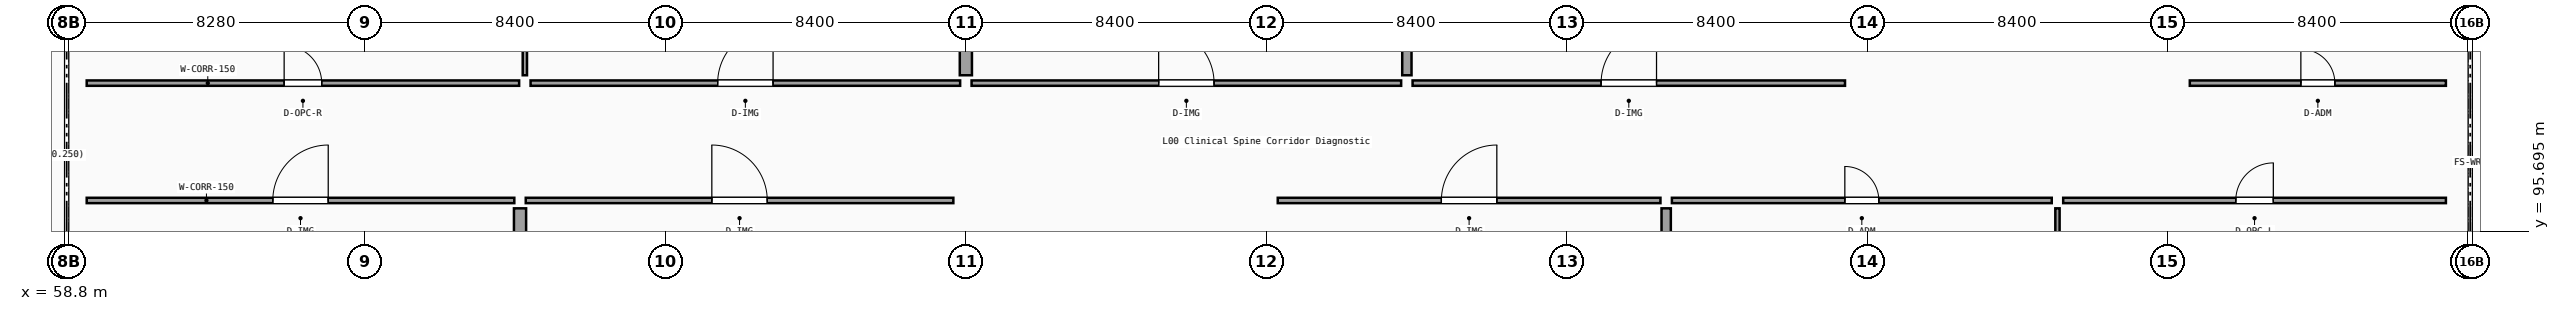
"""IFC4 building model, lengths in metres.
Left out: names, types, materials, properties, quantities, classifications, styles, units other than length and angle.
Written with IfcOpenShell. Run it as: python <this file> out.ifc"""

import sys

from ifc_helpers import new_model, si_unit, direction, frame, frame_2d, origin, place, context, subcontext, project, spatial, rectangle, extrude, element, fill, save


model = new_model("IFC4")
c1 = context("Model", 3, precision=1e-05, world=origin(), true_north=direction((0.0, 1.0)))
c2 = subcontext(c1, "Body", "Model", "MODEL_VIEW")
j1 = project(units=[si_unit("LENGTHUNIT", "METRE"), si_unit("PLANEANGLEUNIT", "RADIAN")], contexts=[c1])
p1 = place(None, origin())
s1 = spatial("IfcSite", under=j1, at=p1, CompositionType="ELEMENT")
p2 = place(p1, origin())
s2 = spatial("IfcBuilding", under=s1, at=p2, CompositionType="ELEMENT")
p3 = place(p2, origin())
s3 = spatial("IfcBuildingStorey", under=s2, at=p3, CompositionType="ELEMENT", Elevation=0.0)
p4 = place(p3, frame((59.42, 96.56, 0.0), z_axis=(0.0, 0.0, 1.0), x_axis=(1.0, 0.0, 0.0)))
e1 = element("IfcWall", 1, at=p4, inside=s3, PredefinedType="PARTITIONING", context=c2, shape_type="SweptSolid", body=[
    extrude(rectangle(XDim=11.955, YDim=0.15, at=frame_2d((5.978, 0.0))), origin(), (0.0, 0.0, 1.0), 4.4),
])
p5 = place(p4, frame((5.202, 0.0, 0.0)))
e2 = element("IfcOpeningElement", 2, at=p5, cuts=e1, PredefinedType="OPENING", context=c2, shape_type="SweptSolid", body=[
    extrude(rectangle(XDim=1.55, YDim=2.25, at=frame_2d((0.775, 1.125))), frame((0.0, 0.085, 0.0), z_axis=(0.0, -1.0, 0.0), x_axis=(1.0, 0.0, 0.0)), (0.0, 0.0, 1.0), 0.17),
])
p6 = place(p3, frame((71.535, 86.69, 0.0), z_axis=(0.0, 0.0, 1.0), x_axis=(0.0, 1.0, 0.0)))
e3 = element("IfcWall", 3, at=p6, inside=s3, PredefinedType="PARTITIONING", context=c2, shape_type="SweptSolid", body=[
    extrude(rectangle(XDim=9.65, YDim=0.34, at=frame_2d((4.825, 0.0))), origin(), (0.0, 0.0, 1.0), 4.31),
])
p7 = place(p3, frame((71.695, 96.56, 0.0), z_axis=(0.0, 0.0, 1.0), x_axis=(1.0, 0.0, 0.0)))
e4 = element("IfcWall", 4, at=p7, inside=s3, PredefinedType="PARTITIONING", context=c2, shape_type="SweptSolid", body=[
    extrude(rectangle(XDim=11.955, YDim=0.15, at=frame_2d((5.978, 0.0))), origin(), (0.0, 0.0, 1.0), 4.4),
])
p8 = place(p7, frame((5.202, 0.0, 0.0)))
e5 = element("IfcOpeningElement", 5, at=p8, cuts=e4, PredefinedType="OPENING", context=c2, shape_type="SweptSolid", body=[
    extrude(rectangle(XDim=1.55, YDim=2.25, at=frame_2d((0.775, 1.125))), frame((0.0, 0.085, 0.0), z_axis=(0.0, -1.0, 0.0), x_axis=(1.0, 0.0, 0.0)), (0.0, 0.0, 1.0), 0.17),
])
p9 = place(p3, frame((92.72, 96.56, 0.0), z_axis=(0.0, 0.0, 1.0), x_axis=(1.0, 0.0, 0.0)))
e6 = element("IfcWall", 6, at=p9, inside=s3, PredefinedType="PARTITIONING", context=c2, shape_type="SweptSolid", body=[
    extrude(rectangle(XDim=10.7, YDim=0.15, at=frame_2d((5.35, 0.0))), origin(), (0.0, 0.0, 1.0), 4.8),
])
p10 = place(p9, frame((4.575, 0.0, 0.0)))
e7 = element("IfcOpeningElement", 7, at=p10, cuts=e6, PredefinedType="OPENING", context=c2, shape_type="SweptSolid", body=[
    extrude(rectangle(XDim=1.55, YDim=2.25, at=frame_2d((0.775, 1.125))), frame((0.0, 0.085, 0.0), z_axis=(0.0, -1.0, 0.0), x_axis=(1.0, 0.0, 0.0)), (0.0, 0.0, 1.0), 0.17),
])
p11 = place(p3, frame((103.58, 86.69, 0.0), z_axis=(0.0, 0.0, 1.0), x_axis=(0.0, 1.0, 0.0)))
e8 = element("IfcWall", 8, at=p11, inside=s3, PredefinedType="PARTITIONING", context=c2, shape_type="SweptSolid", body=[
    extrude(rectangle(XDim=9.65, YDim=0.26, at=frame_2d((4.825, 0.0))), origin(), (0.0, 0.0, 1.0), 4.31),
])
p12 = place(p3, frame((103.74, 96.56, 0.0), z_axis=(0.0, 0.0, 1.0), x_axis=(1.0, 0.0, 0.0)))
e9 = element("IfcWall", 9, at=p12, inside=s3, PredefinedType="PARTITIONING", context=c2, shape_type="SweptSolid", body=[
    extrude(rectangle(XDim=10.62, YDim=0.15, at=frame_2d((5.31, 0.0))), origin(), (0.0, 0.0, 1.0), 4.4),
])
p13 = place(p12, frame((4.835, 0.0, 0.0)))
e10 = element("IfcOpeningElement", 10, at=p13, cuts=e9, PredefinedType="OPENING", context=c2, shape_type="SweptSolid", body=[
    extrude(rectangle(XDim=0.95, YDim=2.1, at=frame_2d((0.475, 1.05))), frame((0.0, 0.085, 0.0), z_axis=(0.0, -1.0, 0.0), x_axis=(1.0, 0.0, 0.0)), (0.0, 0.0, 1.0), 0.17),
])
p14 = place(p3, frame((114.52, 86.69, 0.0), z_axis=(0.0, 0.0, 1.0), x_axis=(0.0, 1.0, 0.0)))
e11 = element("IfcWall", 11, at=p14, inside=s3, PredefinedType="PARTITIONING", context=c2, shape_type="SweptSolid", body=[
    extrude(rectangle(XDim=9.65, YDim=0.12, at=frame_2d((4.825, 0.0))), origin(), (0.0, 0.0, 1.0), 4.31),
])
p15 = place(p3, frame((114.68, 96.56, 0.0), z_axis=(0.0, 0.0, 1.0), x_axis=(1.0, 0.0, 0.0)))
e12 = element("IfcWall", 12, at=p15, inside=s3, PredefinedType="PARTITIONING", context=c2, shape_type="SweptSolid", body=[
    extrude(rectangle(XDim=10.7, YDim=0.15, at=frame_2d((5.35, 0.0))), origin(), (0.0, 0.0, 1.0), 4.4),
])
p16 = place(p15, frame((4.825, 0.0, 0.0)))
e13 = element("IfcOpeningElement", 13, at=p16, cuts=e12, PredefinedType="OPENING", context=c2, shape_type="SweptSolid", body=[
    extrude(rectangle(XDim=1.05, YDim=2.15, at=frame_2d((0.525, 1.075))), frame((0.0, 0.085, 0.0), z_axis=(0.0, -1.0, 0.0), x_axis=(1.0, 0.0, 0.0)), (0.0, 0.0, 1.0), 0.17),
])
p17 = place(p3, frame((59.42, 99.84, 0.0), z_axis=(0.0, 0.0, 1.0), x_axis=(1.0, 0.0, 0.0)))
e14 = element("IfcWall", 14, at=p17, inside=s3, PredefinedType="PARTITIONING", context=c2, shape_type="SweptSolid", body=[
    extrude(rectangle(XDim=12.09, YDim=0.15, at=frame_2d((6.045, 0.0))), origin(), (0.0, 0.0, 1.0), 4.4),
])
p18 = place(p17, frame((5.52, 0.0, 0.0)))
e15 = element("IfcOpeningElement", 15, at=p18, cuts=e14, PredefinedType="OPENING", context=c2, shape_type="SweptSolid", body=[
    extrude(rectangle(XDim=1.05, YDim=2.15, at=frame_2d((0.525, 1.075))), frame((0.0, 0.085, 0.0), z_axis=(0.0, -1.0, 0.0), x_axis=(1.0, 0.0, 0.0)), (0.0, 0.0, 1.0), 0.17),
])
p19 = place(p3, frame((71.67, 100.06, 0.0), z_axis=(0.0, 0.0, 1.0), x_axis=(0.0, 1.0, 0.0)))
e16 = element("IfcWall", 16, at=p19, inside=s3, PredefinedType="PARTITIONING", context=c2, shape_type="SweptSolid", body=[
    extrude(rectangle(XDim=16.05, YDim=0.12, at=frame_2d((8.025, 0.0))), origin(), (0.0, 0.0, 1.0), 4.31),
])
p20 = place(p3, frame((71.83, 99.84, 0.0), z_axis=(0.0, 0.0, 1.0), x_axis=(1.0, 0.0, 0.0)))
e17 = element("IfcWall", 17, at=p20, inside=s3, PredefinedType="PARTITIONING", context=c2, shape_type="SweptSolid", body=[
    extrude(rectangle(XDim=12.01, YDim=0.15, at=frame_2d((6.005, 0.0))), origin(), (0.0, 0.0, 1.0), 4.4),
])
p21 = place(p20, frame((5.23, 0.0, 0.0)))
e18 = element("IfcOpeningElement", 18, at=p21, cuts=e17, PredefinedType="OPENING", context=c2, shape_type="SweptSolid", body=[
    extrude(rectangle(XDim=1.55, YDim=2.25, at=frame_2d((0.775, 1.125))), frame((0.0, 0.085, 0.0), z_axis=(0.0, -1.0, 0.0), x_axis=(1.0, 0.0, 0.0)), (0.0, 0.0, 1.0), 0.17),
])
p22 = place(p3, frame((84.0, 100.06, 0.0), z_axis=(0.0, 0.0, 1.0), x_axis=(0.0, 1.0, 0.0)))
e19 = element("IfcWall", 19, at=p22, inside=s3, PredefinedType="PARTITIONING", context=c2, shape_type="SweptSolid", body=[
    extrude(rectangle(XDim=16.05, YDim=0.34, at=frame_2d((8.025, 0.0))), origin(), (0.0, 0.0, 1.0), 4.8),
])
p23 = place(p3, frame((84.16, 99.84, 0.0), z_axis=(0.0, 0.0, 1.0), x_axis=(1.0, 0.0, 0.0)))
e20 = element("IfcWall", 20, at=p23, inside=s3, PredefinedType="PARTITIONING", context=c2, shape_type="SweptSolid", body=[
    extrude(rectangle(XDim=12.01, YDim=0.15, at=frame_2d((6.005, 0.0))), origin(), (0.0, 0.0, 1.0), 4.8),
])
p24 = place(p23, frame((5.23, 0.0, 0.0)))
e21 = element("IfcOpeningElement", 21, at=p24, cuts=e20, PredefinedType="OPENING", context=c2, shape_type="SweptSolid", body=[
    extrude(rectangle(XDim=1.55, YDim=2.25, at=frame_2d((0.775, 1.125))), frame((0.0, 0.085, 0.0), z_axis=(0.0, -1.0, 0.0), x_axis=(1.0, 0.0, 0.0)), (0.0, 0.0, 1.0), 0.17),
])
p25 = place(p3, frame((96.33, 100.06, 0.0), z_axis=(0.0, 0.0, 1.0), x_axis=(0.0, 1.0, 0.0)))
e22 = element("IfcWall", 22, at=p25, inside=s3, PredefinedType="PARTITIONING", context=c2, shape_type="SweptSolid", body=[
    extrude(rectangle(XDim=16.05, YDim=0.26, at=frame_2d((8.025, 0.0))), origin(), (0.0, 0.0, 1.0), 4.8),
])
p26 = place(p3, frame((96.49, 99.84, 0.0), z_axis=(0.0, 0.0, 1.0), x_axis=(1.0, 0.0, 0.0)))
e23 = element("IfcWall", 23, at=p26, inside=s3, PredefinedType="PARTITIONING", context=c2, shape_type="SweptSolid", body=[
    extrude(rectangle(XDim=12.09, YDim=0.15, at=frame_2d((6.045, 0.0))), origin(), (0.0, 0.0, 1.0), 4.8),
])
p27 = place(p26, frame((5.27, 0.0, 0.0)))
e24 = element("IfcOpeningElement", 24, at=p27, cuts=e23, PredefinedType="OPENING", context=c2, shape_type="SweptSolid", body=[
    extrude(rectangle(XDim=1.55, YDim=2.25, at=frame_2d((0.775, 1.125))), frame((0.0, 0.085, 0.0), z_axis=(0.0, -1.0, 0.0), x_axis=(1.0, 0.0, 0.0)), (0.0, 0.0, 1.0), 0.17),
])
p28 = place(p3, frame((118.22, 99.84, 0.0), z_axis=(0.0, 0.0, 1.0), x_axis=(1.0, 0.0, 0.0)))
e25 = element("IfcWall", 25, at=p28, inside=s3, PredefinedType="PARTITIONING", context=c2, shape_type="SweptSolid", body=[
    extrude(rectangle(XDim=7.16, YDim=0.15, at=frame_2d((3.58, 0.0))), origin(), (0.0, 0.0, 1.0), 4.8),
])
p29 = place(p28, frame((3.105, 0.0, 0.0)))
e26 = element("IfcOpeningElement", 26, at=p29, cuts=e25, PredefinedType="OPENING", context=c2, shape_type="SweptSolid", body=[
    extrude(rectangle(XDim=0.95, YDim=2.1, at=frame_2d((0.475, 1.05))), frame((0.0, 0.085, 0.0), z_axis=(0.0, -1.0, 0.0), x_axis=(1.0, 0.0, 0.0)), (0.0, 0.0, 1.0), 0.17),
])
p30 = place(p5, origin())
e27 = element("IfcDoor", 27, at=p30, inside=s3, OperationType="SINGLE_SWING_RIGHT", PredefinedType="DOOR", context=c2, shape_type="SweptSolid", body=[
    extrude(rectangle(XDim=1.55, YDim=2.25, at=frame_2d((0.775, 1.125))), frame((0.0, 0.025, 0.0), z_axis=(0.0, -1.0, 0.0), x_axis=(1.0, 0.0, 0.0)), (0.0, 0.0, 1.0), 0.05),
])
fill(e2, e27)
p31 = place(p8, origin())
e28 = element("IfcDoor", 28, at=p31, inside=s3, OperationType="SINGLE_SWING_LEFT", PredefinedType="DOOR", context=c2, shape_type="SweptSolid", body=[
    extrude(rectangle(XDim=1.55, YDim=2.25, at=frame_2d((0.775, 1.125))), frame((0.0, 0.025, 0.0), z_axis=(0.0, -1.0, 0.0), x_axis=(1.0, 0.0, 0.0)), (0.0, 0.0, 1.0), 0.05),
])
fill(e5, e28)
p32 = place(p10, origin())
e29 = element("IfcDoor", 29, at=p32, inside=s3, OperationType="SINGLE_SWING_RIGHT", PredefinedType="DOOR", context=c2, shape_type="SweptSolid", body=[
    extrude(rectangle(XDim=1.55, YDim=2.25, at=frame_2d((0.775, 1.125))), frame((0.0, 0.025, 0.0), z_axis=(0.0, -1.0, 0.0), x_axis=(1.0, 0.0, 0.0)), (0.0, 0.0, 1.0), 0.05),
])
fill(e7, e29)
p33 = place(p13, origin())
e30 = element("IfcDoor", 30, at=p33, inside=s3, OperationType="SINGLE_SWING_LEFT", PredefinedType="DOOR", context=c2, shape_type="SweptSolid", body=[
    extrude(rectangle(XDim=0.95, YDim=2.1, at=frame_2d((0.475, 1.05))), frame((0.0, 0.025, 0.0), z_axis=(0.0, -1.0, 0.0), x_axis=(1.0, 0.0, 0.0)), (0.0, 0.0, 1.0), 0.05),
])
fill(e10, e30)
p34 = place(p16, origin())
e31 = element("IfcDoor", 31, at=p34, inside=s3, OperationType="SINGLE_SWING_RIGHT", PredefinedType="DOOR", context=c2, shape_type="SweptSolid", body=[
    extrude(rectangle(XDim=1.05, YDim=2.15, at=frame_2d((0.525, 1.075))), frame((0.0, 0.025, 0.0), z_axis=(0.0, -1.0, 0.0), x_axis=(1.0, 0.0, 0.0)), (0.0, 0.0, 1.0), 0.05),
])
fill(e13, e31)
p35 = place(p18, origin())
e32 = element("IfcDoor", 32, at=p35, inside=s3, OperationType="SINGLE_SWING_LEFT", PredefinedType="DOOR", context=c2, shape_type="SweptSolid", body=[
    extrude(rectangle(XDim=1.05, YDim=2.15, at=frame_2d((0.525, 1.075))), frame((0.0, 0.025, 0.0), z_axis=(0.0, -1.0, 0.0), x_axis=(1.0, 0.0, 0.0)), (0.0, 0.0, 1.0), 0.05),
])
fill(e15, e32)
p36 = place(p21, origin())
e33 = element("IfcDoor", 33, at=p36, inside=s3, OperationType="SINGLE_SWING_RIGHT", PredefinedType="DOOR", context=c2, shape_type="SweptSolid", body=[
    extrude(rectangle(XDim=1.55, YDim=2.25, at=frame_2d((0.775, 1.125))), frame((0.0, 0.025, 0.0), z_axis=(0.0, -1.0, 0.0), x_axis=(1.0, 0.0, 0.0)), (0.0, 0.0, 1.0), 0.05),
])
fill(e18, e33)
p37 = place(p24, origin())
e34 = element("IfcDoor", 34, at=p37, inside=s3, OperationType="SINGLE_SWING_LEFT", PredefinedType="DOOR", context=c2, shape_type="SweptSolid", body=[
    extrude(rectangle(XDim=1.55, YDim=2.25, at=frame_2d((0.775, 1.125))), frame((0.0, 0.025, 0.0), z_axis=(0.0, -1.0, 0.0), x_axis=(1.0, 0.0, 0.0)), (0.0, 0.0, 1.0), 0.05),
])
fill(e21, e34)
p38 = place(p27, origin())
e35 = element("IfcDoor", 35, at=p38, inside=s3, OperationType="SINGLE_SWING_RIGHT", PredefinedType="DOOR", context=c2, shape_type="SweptSolid", body=[
    extrude(rectangle(XDim=1.55, YDim=2.25, at=frame_2d((0.775, 1.125))), frame((0.0, 0.025, 0.0), z_axis=(0.0, -1.0, 0.0), x_axis=(1.0, 0.0, 0.0)), (0.0, 0.0, 1.0), 0.05),
])
fill(e24, e35)
p39 = place(p29, origin())
e36 = element("IfcDoor", 36, at=p39, inside=s3, OperationType="SINGLE_SWING_LEFT", PredefinedType="DOOR", context=c2, shape_type="SweptSolid", body=[
    extrude(rectangle(XDim=0.95, YDim=2.1, at=frame_2d((0.475, 1.05))), frame((0.0, 0.025, 0.0), z_axis=(0.0, -1.0, 0.0), x_axis=(1.0, 0.0, 0.0)), (0.0, 0.0, 1.0), 0.05),
])
fill(e26, e36)
save(model, sys.argv[1])
